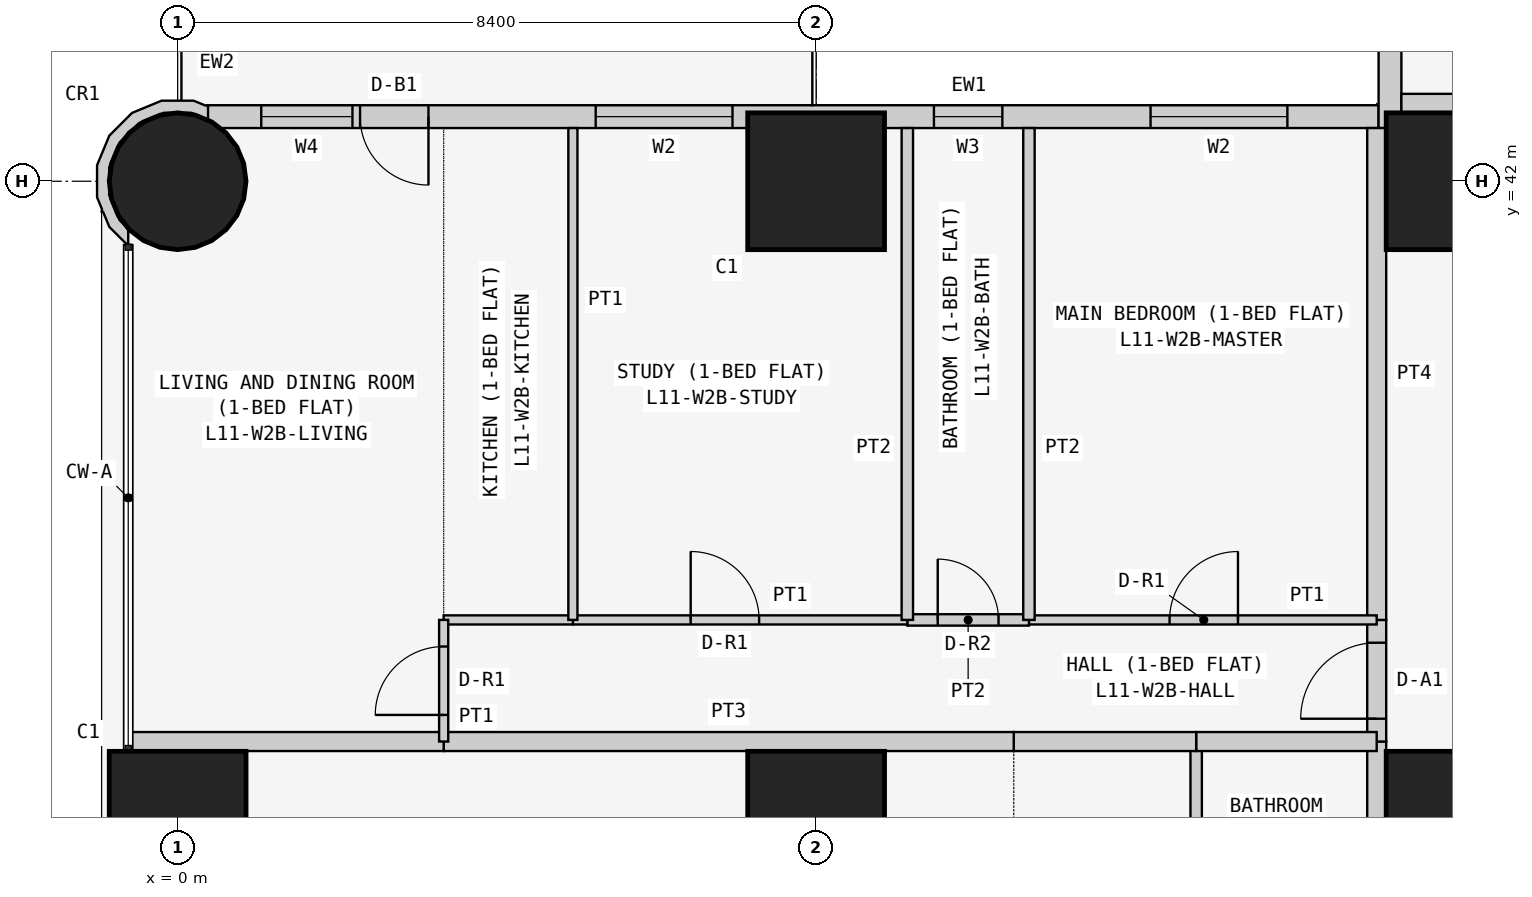
"""IFC4 building model, lengths in metres.
Left out: names, types, materials, properties, quantities, classifications, styles, units other than length and angle.
Written with IfcOpenShell. Run it as: python <this file> out.ifc"""

import sys

from ifc_helpers import new_model, si_unit, direction, frame, frame_2d, origin, origin_2d, place, context, subcontext, project, spatial, polyline, rectangle, circle, outline, extrude, element, fill, save


model = new_model("IFC4")
c1 = context("Model", 3, precision=1e-05, world=origin(), true_north=direction((0.0, 1.0)))
c2 = subcontext(c1, "Body", "Model", "MODEL_VIEW")
j1 = project(units=[si_unit("LENGTHUNIT", "METRE"), si_unit("PLANEANGLEUNIT", "RADIAN")], contexts=[c1])
p1 = place(None, origin())
s1 = spatial("IfcSite", under=j1, at=p1, CompositionType="ELEMENT")
p2 = place(p1, origin())
s2 = spatial("IfcBuilding", under=s1, at=p2, CompositionType="ELEMENT")
p3 = place(p2, frame((0.0, 0.0, 48.9)))
s3 = spatial("IfcBuildingStorey", under=s2, at=p3, CompositionType="ELEMENT", Elevation=48.9)
p4 = place(p3, frame((0.0, 33.6, 0.0), z_axis=(0.0, 0.0, 1.0), x_axis=(1.0, 0.0, 0.0)))
e1 = element("IfcColumn", 1, at=p4, inside=s3, PredefinedType="COLUMN", context=c2, shape_type="SweptSolid", body=[
    extrude(rectangle(XDim=1.8, YDim=1.8, at=origin_2d()), origin(), (0.0, 0.0, 1.0), 3.6),
])
p5 = place(p3, frame((0.0, 42.0, 0.0), z_axis=(0.0, 0.0, 1.0), x_axis=(1.0, 0.0, 0.0)))
e2 = element("IfcColumn", 2, at=p5, inside=s3, PredefinedType="COLUMN", context=c2, shape_type="SweptSolid", body=[
    extrude(circle(Radius=0.9, at=origin_2d()), origin(), (0.0, 0.0, 1.0), 3.6),
])
for number, where, z_axis, x_axis in (
    (3, (8.4, 33.6, 0.0), (0.0, 0.0, 1.0), (1.0, 0.0, 0.0)),
    (4, (8.4, 42.0, 0.0), (0.0, 0.0, 1.0), (1.0, 0.0, 0.0)),
    (5, (16.8, 33.6, 0.0), (0.0, 0.0, 1.0), (1.0, 0.0, 0.0)),
    (6, (16.8, 42.0, 0.0), (0.0, 0.0, 1.0), (1.0, 0.0, 0.0)),
):
    element("IfcColumn", number, at=place(p3, frame(where, z_axis=z_axis, x_axis=x_axis)), inside=s3, PredefinedType="COLUMN", context=c2, shape_type="SweptSolid", body=[
        extrude(rectangle(XDim=1.8, YDim=1.8, at=origin_2d()), origin(), (0.0, 0.0, 1.0), 3.6),
    ])
p6 = place(p3, frame((15.8, 42.85, 0.0), z_axis=(0.0, 0.0, 1.0), x_axis=(-1.0, 0.0, 0.0)))
e7 = element("IfcWall", 7, at=p6, inside=s3, PredefinedType="SOLIDWALL", context=c2, shape_type="SweptSolid", body=[
    extrude(rectangle(XDim=15.4, YDim=0.3, at=frame_2d((7.7, 0.0))), origin(), (0.0, 0.0, 1.0), 3.45),
])
p7 = place(p6, frame((1.2, 0.0, 0.9)))
e8 = element("IfcOpeningElement", 8, at=p7, cuts=e7, PredefinedType="OPENING", context=c2, shape_type="SweptSolid", body=[
    extrude(rectangle(XDim=1.8, YDim=1.5, at=frame_2d((0.9, 0.75))), frame((0.0, 0.16, 0.0), z_axis=(0.0, -1.0, 0.0), x_axis=(1.0, 0.0, 0.0)), (0.0, 0.0, 1.0), 0.32),
])
p8 = place(p6, frame((4.95, 0.0, 1.5)))
e9 = element("IfcOpeningElement", 9, at=p8, cuts=e7, PredefinedType="OPENING", context=c2, shape_type="SweptSolid", body=[
    extrude(rectangle(XDim=0.9, YDim=0.7, at=frame_2d((0.45, 0.35))), frame((0.0, 0.16, 0.0), z_axis=(0.0, -1.0, 0.0), x_axis=(1.0, 0.0, 0.0)), (0.0, 0.0, 1.0), 0.32),
])
p9 = place(p6, frame((8.5, 0.0, 0.9)))
e10 = element("IfcOpeningElement", 10, at=p9, cuts=e7, PredefinedType="OPENING", context=c2, shape_type="SweptSolid", body=[
    extrude(rectangle(XDim=1.8, YDim=1.5, at=frame_2d((0.9, 0.75))), frame((0.0, 0.16, 0.0), z_axis=(0.0, -1.0, 0.0), x_axis=(1.0, 0.0, 0.0)), (0.0, 0.0, 1.0), 0.32),
])
p10 = place(p6, frame((12.5, 0.0, 0.0)))
e11 = element("IfcOpeningElement", 11, at=p10, cuts=e7, PredefinedType="OPENING", context=c2, shape_type="SweptSolid", body=[
    extrude(rectangle(XDim=0.9, YDim=2.4, at=frame_2d((0.45, 1.2))), frame((0.0, 0.16, 0.0), z_axis=(0.0, -1.0, 0.0), x_axis=(1.0, 0.0, 0.0)), (0.0, 0.0, 1.0), 0.32),
])
p11 = place(p6, frame((13.5, 0.0, 0.9)))
e12 = element("IfcOpeningElement", 12, at=p11, cuts=e7, PredefinedType="OPENING", context=c2, shape_type="SweptSolid", body=[
    extrude(rectangle(XDim=1.2, YDim=1.5, at=frame_2d((0.6, 0.75))), frame((0.0, 0.16, 0.0), z_axis=(0.0, -1.0, 0.0), x_axis=(1.0, 0.0, 0.0)), (0.0, 0.0, 1.0), 0.32),
])
p12 = place(p3, frame((15.95, 58.4, 0.0), z_axis=(0.0, 0.0, 1.0), x_axis=(0.0, -1.0, 0.0)))
e13 = element("IfcWall", 13, at=p12, inside=s3, PredefinedType="SOLIDWALL", context=c2, shape_type="SweptSolid", body=[
    extrude(rectangle(XDim=15.7, YDim=0.3, at=frame_2d((7.85, 0.0))), origin(), (0.0, 0.0, 1.0), 3.45),
])
p13 = place(p12, frame((12.4, 0.0, 0.9)))
e14 = element("IfcOpeningElement", 14, at=p13, cuts=e13, PredefinedType="OPENING", context=c2, shape_type="SweptSolid", body=[
    extrude(rectangle(XDim=1.8, YDim=1.5, at=frame_2d((0.9, 0.75))), frame((0.0, 0.16, 0.0), z_axis=(0.0, -1.0, 0.0), x_axis=(1.0, 0.0, 0.0)), (0.0, 0.0, 1.0), 0.32),
])
p14 = place(p12, frame((9.55, 0.0, 1.5)))
e15 = element("IfcOpeningElement", 15, at=p14, cuts=e13, PredefinedType="OPENING", context=c2, shape_type="SweptSolid", body=[
    extrude(rectangle(XDim=0.9, YDim=0.7, at=frame_2d((0.45, 0.35))), frame((0.0, 0.16, 0.0), z_axis=(0.0, -1.0, 0.0), x_axis=(1.0, 0.0, 0.0)), (0.0, 0.0, 1.0), 0.32),
])
p15 = place(p12, frame((5.1, 0.0, 0.9)))
e16 = element("IfcOpeningElement", 16, at=p15, cuts=e13, PredefinedType="OPENING", context=c2, shape_type="SweptSolid", body=[
    extrude(rectangle(XDim=1.8, YDim=1.5, at=frame_2d((0.9, 0.75))), frame((0.0, 0.16, 0.0), z_axis=(0.0, -1.0, 0.0), x_axis=(1.0, 0.0, 0.0)), (0.0, 0.0, 1.0), 0.32),
])
p16 = place(p12, frame((2.0, 0.0, 0.0)))
e17 = element("IfcOpeningElement", 17, at=p16, cuts=e13, PredefinedType="OPENING", context=c2, shape_type="SweptSolid", body=[
    extrude(rectangle(XDim=0.9, YDim=2.4, at=frame_2d((0.45, 1.2))), frame((0.0, 0.16, 0.0), z_axis=(0.0, -1.0, 0.0), x_axis=(1.0, 0.0, 0.0)), (0.0, 0.0, 1.0), 0.32),
])
p17 = place(p12, frame((0.7, 0.0, 0.9)))
e18 = element("IfcOpeningElement", 18, at=p17, cuts=e13, PredefinedType="OPENING", context=c2, shape_type="SweptSolid", body=[
    extrude(rectangle(XDim=1.2, YDim=1.5, at=frame_2d((0.6, 0.75))), frame((0.0, 0.16, 0.0), z_axis=(0.0, -1.0, 0.0), x_axis=(1.0, 0.0, 0.0)), (0.0, 0.0, 1.0), 0.32),
])
p18 = place(p3, frame((0.364, 42.91, 0.0), z_axis=(0.0, 0.0, 1.0), x_axis=(-0.926129809145, 0.377204953059, 0.0)))
e19 = element("IfcWall", 19, at=p18, inside=s3, PredefinedType="SOLIDWALL", context=c2, shape_type="SweptSolid", body=[
    extrude(outline(polyline([(0.36, 1.803), (0.509, 1.741), (0.761, 1.486), (0.896, 1.154), (0.894, 0.795), (0.755, 0.465), (0.5, 0.213), (0.168, 0.078), (-0.1, 0.08), (0.001, -0.097), (0.03, -0.08), (0.199, -0.081), (0.589, 0.078), (0.889, 0.374), (1.053, 0.763), (1.055, 1.185), (0.896, 1.575), (0.778, 1.695), (0.769, 1.728), (0.75, 1.723), (0.6, 1.875), (0.295, 2.003), (0.281, 1.998), (0.36, 1.803)])), origin(), (0.0, 0.0, 1.0), 3.45),
])
p19 = place(p3, frame((16.1, 43.025, 0.0), z_axis=(0.0, 0.0, 1.0), x_axis=(1.0, 0.0, 0.0)))
e20 = element("IfcWall", 20, at=p19, inside=s3, PredefinedType="PARTITIONING", context=c2, shape_type="SweptSolid", body=[
    extrude(rectangle(XDim=6.871, YDim=0.25, at=frame_2d((3.436, 0.0))), origin(), (0.0, 0.0, 1.0), 3.45),
])
p20 = place(p3, frame((15.775, 32.0, 0.0), z_axis=(0.0, 0.0, 1.0), x_axis=(0.0, 1.0, 0.0)))
e21 = element("IfcWall", 21, at=p20, inside=s3, PredefinedType="PARTITIONING", context=c2, shape_type="SweptSolid", body=[
    extrude(rectangle(XDim=2.629, YDim=0.25, at=frame_2d((1.314, 0.0))), origin(), (0.0, 0.0, 1.0), 3.45),
])
p21 = place(p3, frame((15.775, 34.629, 0.0), z_axis=(0.0, 0.0, 1.0), x_axis=(0.0, 1.0, 0.0)))
e22 = element("IfcWall", 22, at=p21, inside=s3, PredefinedType="PARTITIONING", context=c2, shape_type="SweptSolid", body=[
    extrude(rectangle(XDim=1.6, YDim=0.25, at=frame_2d((0.8, 0.0))), origin(), (0.0, 0.0, 1.0), 3.45),
])
p22 = place(p21, frame((0.3, 0.0, 0.0)))
e23 = element("IfcOpeningElement", 23, at=p22, cuts=e22, PredefinedType="OPENING", context=c2, shape_type="SweptSolid", body=[
    extrude(rectangle(XDim=1.0, YDim=2.1, at=frame_2d((0.5, 1.05))), frame((0.0, 0.135, 0.0), z_axis=(0.0, -1.0, 0.0), x_axis=(1.0, 0.0, 0.0)), (0.0, 0.0, 1.0), 0.27),
])
p23 = place(p3, frame((15.775, 36.229, 0.0), z_axis=(0.0, 0.0, 1.0), x_axis=(0.0, 1.0, 0.0)))
e24 = element("IfcWall", 24, at=p23, inside=s3, PredefinedType="PARTITIONING", context=c2, shape_type="SweptSolid", body=[
    extrude(rectangle(XDim=6.471, YDim=0.25, at=frame_2d((3.235, 0.0))), origin(), (0.0, 0.0, 1.0), 3.45),
])
p24 = place(p3, frame((13.4, 32.0, 0.0), z_axis=(0.0, 0.0, 1.0), x_axis=(0.0, 1.0, 0.0)))
e25 = element("IfcWall", 25, at=p24, inside=s3, PredefinedType="PARTITIONING", context=c2, shape_type="SweptSolid", body=[
    extrude(rectangle(XDim=2.629, YDim=0.15, at=frame_2d((1.314, 0.0))), origin(), (0.0, 0.0, 1.0), 3.45),
])
p25 = place(p3, frame((13.4, 34.629, 0.0), z_axis=(0.0, 0.0, 1.0), x_axis=(1.0, 0.0, 0.0)))
e26 = element("IfcWall", 26, at=p25, inside=s3, PredefinedType="PARTITIONING", context=c2, shape_type="SweptSolid", body=[
    extrude(rectangle(XDim=2.375, YDim=0.25, at=frame_2d((1.188, 0.0))), origin(), (0.0, 0.0, 1.0), 3.45),
])
p26 = place(p3, frame((11.0, 34.629, 0.0), z_axis=(0.0, 0.0, 1.0), x_axis=(1.0, 0.0, 0.0)))
e27 = element("IfcWall", 27, at=p26, inside=s3, PredefinedType="PARTITIONING", context=c2, shape_type="SweptSolid", body=[
    extrude(rectangle(XDim=2.4, YDim=0.25, at=frame_2d((1.2, 0.0))), origin(), (0.0, 0.0, 1.0), 3.45),
])
p27 = place(p3, frame((3.5, 34.629, 0.0), z_axis=(0.0, 0.0, 1.0), x_axis=(1.0, 0.0, 0.0)))
e28 = element("IfcWall", 28, at=p27, inside=s3, PredefinedType="PARTITIONING", context=c2, shape_type="SweptSolid", body=[
    extrude(rectangle(XDim=7.5, YDim=0.25, at=frame_2d((3.75, 0.0))), origin(), (0.0, 0.0, 1.0), 3.45),
])
p28 = place(p3, frame((-0.65, 34.629, 0.0), z_axis=(0.0, 0.0, 1.0), x_axis=(1.0, 0.0, 0.0)))
e29 = element("IfcWall", 29, at=p28, inside=s3, PredefinedType="PARTITIONING", context=c2, shape_type="SweptSolid", body=[
    extrude(rectangle(XDim=4.15, YDim=0.25, at=frame_2d((2.075, 0.0))), origin(), (0.0, 0.0, 1.0), 3.45),
])
p29 = place(p3, frame((11.2, 36.229, 0.0), z_axis=(0.0, 0.0, 1.0), x_axis=(1.0, 0.0, 0.0)))
e30 = element("IfcWall", 30, at=p29, inside=s3, PredefinedType="PARTITIONING", context=c2, shape_type="SweptSolid", body=[
    extrude(rectangle(XDim=4.575, YDim=0.12, at=frame_2d((2.288, 0.0))), origin(), (0.0, 0.0, 1.0), 3.45),
])
p30 = place(p29, frame((1.85, 0.0, 0.0)))
e31 = element("IfcOpeningElement", 31, at=p30, cuts=e30, PredefinedType="OPENING", context=c2, shape_type="SweptSolid", body=[
    extrude(rectangle(XDim=0.9, YDim=2.1, at=frame_2d((0.45, 1.05))), frame((0.0, 0.07, 0.0), z_axis=(0.0, -1.0, 0.0), x_axis=(1.0, 0.0, 0.0)), (0.0, 0.0, 1.0), 0.14),
])
p31 = place(p3, frame((9.6, 36.229, 0.0), z_axis=(0.0, 0.0, 1.0), x_axis=(1.0, 0.0, 0.0)))
e32 = element("IfcWall", 32, at=p31, inside=s3, PredefinedType="PARTITIONING", context=c2, shape_type="SweptSolid", body=[
    extrude(rectangle(XDim=1.6, YDim=0.15, at=frame_2d((0.8, 0.0))), origin(), (0.0, 0.0, 1.0), 3.45),
])
p32 = place(p31, frame((0.4, 0.0, 0.0)))
e33 = element("IfcOpeningElement", 33, at=p32, cuts=e32, PredefinedType="OPENING", context=c2, shape_type="SweptSolid", body=[
    extrude(rectangle(XDim=0.8, YDim=2.1, at=frame_2d((0.4, 1.05))), frame((0.0, 0.085, 0.0), z_axis=(0.0, -1.0, 0.0), x_axis=(1.0, 0.0, 0.0)), (0.0, 0.0, 1.0), 0.17),
])
p33 = place(p3, frame((5.2, 36.229, 0.0), z_axis=(0.0, 0.0, 1.0), x_axis=(1.0, 0.0, 0.0)))
e34 = element("IfcWall", 34, at=p33, inside=s3, PredefinedType="PARTITIONING", context=c2, shape_type="SweptSolid", body=[
    extrude(rectangle(XDim=4.4, YDim=0.12, at=frame_2d((2.2, 0.0))), origin(), (0.0, 0.0, 1.0), 3.45),
])
p34 = place(p33, frame((1.55, 0.0, 0.0)))
e35 = element("IfcOpeningElement", 35, at=p34, cuts=e34, PredefinedType="OPENING", context=c2, shape_type="SweptSolid", body=[
    extrude(rectangle(XDim=0.9, YDim=2.1, at=frame_2d((0.45, 1.05))), frame((0.0, 0.07, 0.0), z_axis=(0.0, -1.0, 0.0), x_axis=(1.0, 0.0, 0.0)), (0.0, 0.0, 1.0), 0.14),
])
p35 = place(p3, frame((3.5, 36.229, 0.0), z_axis=(0.0, 0.0, 1.0), x_axis=(1.0, 0.0, 0.0)))
e36 = element("IfcWall", 36, at=p35, inside=s3, PredefinedType="PARTITIONING", context=c2, shape_type="SweptSolid", body=[
    extrude(rectangle(XDim=1.7, YDim=0.12, at=frame_2d((0.85, 0.0))), origin(), (0.0, 0.0, 1.0), 3.45),
])
p36 = place(p3, frame((3.5, 34.629, 0.0), z_axis=(0.0, 0.0, 1.0), x_axis=(0.0, 1.0, 0.0)))
e37 = element("IfcWall", 37, at=p36, inside=s3, PredefinedType="PARTITIONING", context=c2, shape_type="SweptSolid", body=[
    extrude(rectangle(XDim=1.6, YDim=0.12, at=frame_2d((0.8, 0.0))), origin(), (0.0, 0.0, 1.0), 3.45),
])
p37 = place(p36, frame((0.35, 0.0, 0.0)))
e38 = element("IfcOpeningElement", 38, at=p37, cuts=e37, PredefinedType="OPENING", context=c2, shape_type="SweptSolid", body=[
    extrude(rectangle(XDim=0.9, YDim=2.1, at=frame_2d((0.45, 1.05))), frame((0.0, 0.07, 0.0), z_axis=(0.0, -1.0, 0.0), x_axis=(1.0, 0.0, 0.0)), (0.0, 0.0, 1.0), 0.14),
])
for number, where, z_axis, x_axis in (
    (39, (11.2, 36.229, 0.0), (0.0, 0.0, 1.0), (0.0, 1.0, 0.0)),
    (40, (9.6, 36.229, 0.0), (0.0, 0.0, 1.0), (0.0, 1.0, 0.0)),
):
    element("IfcWall", number, at=place(p3, frame(where, z_axis=z_axis, x_axis=x_axis)), inside=s3, PredefinedType="PARTITIONING", context=c2, shape_type="SweptSolid", body=[
        extrude(rectangle(XDim=6.471, YDim=0.15, at=frame_2d((3.235, 0.0))), origin(), (0.0, 0.0, 1.0), 3.45),
    ])
p38 = place(p3, frame((5.2, 36.229, 0.0), z_axis=(0.0, 0.0, 1.0), x_axis=(0.0, 1.0, 0.0)))
e41 = element("IfcWall", 41, at=p38, inside=s3, PredefinedType="PARTITIONING", context=c2, shape_type="SweptSolid", body=[
    extrude(rectangle(XDim=6.471, YDim=0.12, at=frame_2d((3.235, 0.0))), origin(), (0.0, 0.0, 1.0), 3.45),
])
p39 = place(p7, origin())
e42 = element("IfcWindow", 42, at=p39, inside=s3, PartitioningType="SINGLE_PANEL", PredefinedType="WINDOW", context=c2, shape_type="SweptSolid", body=[
    extrude(rectangle(XDim=1.8, YDim=1.5, at=frame_2d((0.9, 0.75))), frame((0.0, 0.03, 0.0), z_axis=(0.0, -1.0, 0.0), x_axis=(1.0, 0.0, 0.0)), (0.0, 0.0, 1.0), 0.06),
])
fill(e8, e42)
p40 = place(p8, origin())
e43 = element("IfcWindow", 43, at=p40, inside=s3, PartitioningType="SINGLE_PANEL", PredefinedType="WINDOW", context=c2, shape_type="SweptSolid", body=[
    extrude(rectangle(XDim=0.9, YDim=0.7, at=frame_2d((0.45, 0.35))), frame((0.0, 0.03, 0.0), z_axis=(0.0, -1.0, 0.0), x_axis=(1.0, 0.0, 0.0)), (0.0, 0.0, 1.0), 0.06),
])
fill(e9, e43)
p41 = place(p9, origin())
e44 = element("IfcWindow", 44, at=p41, inside=s3, PartitioningType="SINGLE_PANEL", PredefinedType="WINDOW", context=c2, shape_type="SweptSolid", body=[
    extrude(rectangle(XDim=1.8, YDim=1.5, at=frame_2d((0.9, 0.75))), frame((0.0, 0.03, 0.0), z_axis=(0.0, -1.0, 0.0), x_axis=(1.0, 0.0, 0.0)), (0.0, 0.0, 1.0), 0.06),
])
fill(e10, e44)
p42 = place(p10, origin())
e45 = element("IfcDoor", 45, at=p42, inside=s3, OperationType="SINGLE_SWING_LEFT", PredefinedType="DOOR", context=c2, shape_type="SweptSolid", body=[
    extrude(rectangle(XDim=0.9, YDim=2.4, at=frame_2d((0.45, 1.2))), frame((0.0, 0.025, 0.0), z_axis=(0.0, -1.0, 0.0), x_axis=(1.0, 0.0, 0.0)), (0.0, 0.0, 1.0), 0.05),
])
fill(e11, e45)
p43 = place(p11, origin())
e46 = element("IfcWindow", 46, at=p43, inside=s3, PartitioningType="SINGLE_PANEL", PredefinedType="WINDOW", context=c2, shape_type="SweptSolid", body=[
    extrude(rectangle(XDim=1.2, YDim=1.5, at=frame_2d((0.6, 0.75))), frame((0.0, 0.03, 0.0), z_axis=(0.0, -1.0, 0.0), x_axis=(1.0, 0.0, 0.0)), (0.0, 0.0, 1.0), 0.06),
])
fill(e12, e46)
p44 = place(p22, origin())
e47 = element("IfcDoor", 47, at=p44, inside=s3, OperationType="SINGLE_SWING_LEFT", PredefinedType="DOOR", context=c2, shape_type="SweptSolid", body=[
    extrude(rectangle(XDim=1.0, YDim=2.1, at=frame_2d((0.5, 1.05))), frame((0.0, 0.025, 0.0), z_axis=(0.0, -1.0, 0.0), x_axis=(1.0, 0.0, 0.0)), (0.0, 0.0, 1.0), 0.05),
])
fill(e23, e47)
p45 = place(p30, origin())
e48 = element("IfcDoor", 48, at=p45, inside=s3, OperationType="SINGLE_SWING_RIGHT", PredefinedType="DOOR", context=c2, shape_type="SweptSolid", body=[
    extrude(rectangle(XDim=0.9, YDim=2.1, at=frame_2d((0.45, 1.05))), frame((0.0, 0.025, 0.0), z_axis=(0.0, -1.0, 0.0), x_axis=(1.0, 0.0, 0.0)), (0.0, 0.0, 1.0), 0.05),
])
fill(e31, e48)
p46 = place(p32, origin())
e49 = element("IfcDoor", 49, at=p46, inside=s3, OperationType="SINGLE_SWING_LEFT", PredefinedType="DOOR", context=c2, shape_type="SweptSolid", body=[
    extrude(rectangle(XDim=0.8, YDim=2.1, at=frame_2d((0.4, 1.05))), frame((0.0, 0.025, 0.0), z_axis=(0.0, -1.0, 0.0), x_axis=(1.0, 0.0, 0.0)), (0.0, 0.0, 1.0), 0.05),
])
fill(e33, e49)
p47 = place(p34, origin())
e50 = element("IfcDoor", 50, at=p47, inside=s3, OperationType="SINGLE_SWING_LEFT", PredefinedType="DOOR", context=c2, shape_type="SweptSolid", body=[
    extrude(rectangle(XDim=0.9, YDim=2.1, at=frame_2d((0.45, 1.05))), frame((0.0, 0.025, 0.0), z_axis=(0.0, -1.0, 0.0), x_axis=(1.0, 0.0, 0.0)), (0.0, 0.0, 1.0), 0.05),
])
fill(e35, e50)
p48 = place(p37, origin())
e51 = element("IfcDoor", 51, at=p48, inside=s3, OperationType="SINGLE_SWING_LEFT", PredefinedType="DOOR", context=c2, shape_type="SweptSolid", body=[
    extrude(rectangle(XDim=0.9, YDim=2.1, at=frame_2d((0.45, 1.05))), frame((0.0, 0.025, 0.0), z_axis=(0.0, -1.0, 0.0), x_axis=(1.0, 0.0, 0.0)), (0.0, 0.0, 1.0), 0.05),
])
fill(e38, e51)
save(model, sys.argv[1])
